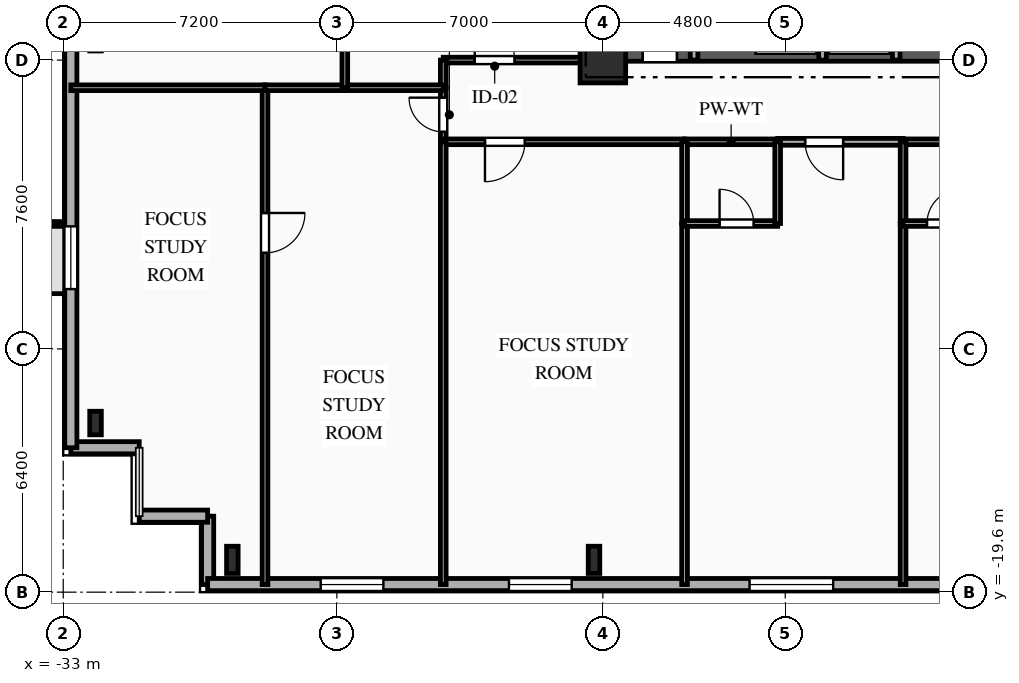
"""IFC4 building model, lengths in metres.
Left out: names, types, materials, properties, quantities, classifications, styles, units other than length and angle.
Written with IfcOpenShell. Run it as: python <this file> out.ifc"""

import sys

from ifc_helpers import new_model, si_unit, direction, frame, frame_2d, origin, origin_2d, place, context, subcontext, project, spatial, rectangle, i_section, extrude, element, fill, save


model = new_model("IFC4")
c1 = context("Model", 3, precision=1e-05, world=origin(), true_north=direction((0.0, 1.0)))
c2 = subcontext(c1, "Body", "Model", "MODEL_VIEW")
j1 = project(units=[si_unit("LENGTHUNIT", "METRE"), si_unit("PLANEANGLEUNIT", "RADIAN")], contexts=[c1])
p1 = place(None, origin())
s1 = spatial("IfcSite", under=j1, at=p1, CompositionType="ELEMENT")
p2 = place(p1, origin())
s2 = spatial("IfcBuilding", under=s1, at=p2, CompositionType="ELEMENT")
p3 = place(p2, frame((0.0, 0.0, 67.2)))
s3 = spatial("IfcBuildingStorey", under=s2, at=p3, CompositionType="ELEMENT", Elevation=67.2)
p4 = place(p3, frame((-18.8, -5.6, 0.0), z_axis=(0.0, 0.0, 1.0), x_axis=(1.0, 0.0, 0.0)))
e1 = element("IfcColumn", 1, at=p4, inside=s3, PredefinedType="COLUMN", context=c2, shape_type="SweptSolid", body=[
    extrude(rectangle(XDim=1.2, YDim=1.2, at=origin_2d()), origin(), (0.0, 0.0, 1.0), 3.35),
])
for number, where, z_axis, x_axis in (
    (2, (-28.55, -18.75, 0.0), (0.0, 0.0, 1.0), (1.0, 0.0, 0.0)),
    (3, (-19.033, -18.75, 0.0), (0.0, 0.0, 1.0), (1.0, 0.0, 0.0)),
):
    element("IfcColumn", number, at=place(p3, frame(where, z_axis=z_axis, x_axis=x_axis)), inside=s3, PredefinedType="COLUMN", context=c2, shape_type="SweptSolid", body=[
        extrude(i_section(OverallWidth=0.304, OverallDepth=0.716, WebThickness=0.021, FlangeThickness=0.04, FilletRadius=0.027, at=origin_2d()), origin(), (0.0, 0.0, 1.0), 3.35),
    ])
p5 = place(p3, frame((-32.15, -15.15, 0.0), z_axis=(0.0, 0.0, 1.0), x_axis=(1.0, 0.0, 0.0)))
e4 = element("IfcColumn", 4, at=p5, inside=s3, PredefinedType="COLUMN", context=c2, shape_type="SweptSolid", body=[
    extrude(i_section(OverallWidth=0.305, OverallDepth=0.62, WebThickness=0.021, FlangeThickness=0.04, FilletRadius=0.027, at=origin_2d()), origin(), (0.0, 0.0, 1.0), 3.35),
])
p6 = place(p3, frame((-29.2, -19.4, 0.0), z_axis=(0.0, 0.0, 1.0), x_axis=(0.0, 1.0, 0.0)))
e5 = element("IfcWall", 5, at=p6, inside=s3, PredefinedType="SOLIDWALL", context=c2, shape_type="SweptSolid", body=[
    extrude(rectangle(XDim=1.8, YDim=0.32, at=frame_2d((0.9, 0.0))), origin(), (0.0, 0.0, 1.0), 3.035),
])
for number, where, z_axis, x_axis in (
    (6, (-29.2, -17.6, 0.0), (0.0, 0.0, 1.0), (-1.0, 0.0, 0.0)),
    (7, (-31.0, -15.8, 0.0), (0.0, 0.0, 1.0), (-1.0, 0.0, 0.0)),
):
    element("IfcWall", number, at=place(p3, frame(where, z_axis=z_axis, x_axis=x_axis)), inside=s3, PredefinedType="SOLIDWALL", context=c2, shape_type="SweptSolid", body=[
        extrude(rectangle(XDim=1.8, YDim=0.32, at=frame_2d((0.9, 0.0))), origin(), (0.0, 0.0, 1.0), 3.035),
    ])
p7 = place(p3, frame((-32.8, -15.8, 0.0), z_axis=(0.0, 0.0, 1.0), x_axis=(0.0, 1.0, 0.0)))
e8 = element("IfcWall", 8, at=p7, inside=s3, PredefinedType="SOLIDWALL", context=c2, shape_type="SweptSolid", body=[
    extrude(rectangle(XDim=31.6, YDim=0.32, at=frame_2d((15.8, 0.0))), origin(), (0.0, 0.0, 1.0), 3.035),
])
p8 = place(p7, frame((4.175, 0.0, 0.85)))
e9 = element("IfcOpeningElement", 9, at=p8, cuts=e8, PredefinedType="OPENING", context=c2, shape_type="SweptSolid", body=[
    extrude(rectangle(XDim=1.65, YDim=1.85, at=frame_2d((0.825, 0.925))), frame((0.0, 0.17, 0.0), z_axis=(0.0, -1.0, 0.0), x_axis=(1.0, 0.0, 0.0)), (0.0, 0.0, 1.0), 0.34),
])
p9 = place(p7, frame((15.015, 0.0, 0.85)))
e10 = element("IfcOpeningElement", 10, at=p9, cuts=e8, PredefinedType="OPENING", context=c2, shape_type="SweptSolid", body=[
    extrude(rectangle(XDim=1.65, YDim=1.85, at=frame_2d((0.825, 0.925))), frame((0.0, 0.17, 0.0), z_axis=(0.0, -1.0, 0.0), x_axis=(1.0, 0.0, 0.0)), (0.0, 0.0, 1.0), 0.34),
])
p10 = place(p7, frame((25.855, 0.0, 0.85)))
e11 = element("IfcOpeningElement", 11, at=p10, cuts=e8, PredefinedType="OPENING", context=c2, shape_type="SweptSolid", body=[
    extrude(rectangle(XDim=1.65, YDim=1.85, at=frame_2d((0.825, 0.925))), frame((0.0, 0.17, 0.0), z_axis=(0.0, -1.0, 0.0), x_axis=(1.0, 0.0, 0.0)), (0.0, 0.0, 1.0), 0.34),
])
p11 = place(p3, frame((29.2, -19.4, 0.0), z_axis=(0.0, 0.0, 1.0), x_axis=(-1.0, 0.0, 0.0)))
e12 = element("IfcWall", 12, at=p11, inside=s3, PredefinedType="SOLIDWALL", context=c2, shape_type="SweptSolid", body=[
    extrude(rectangle(XDim=58.4, YDim=0.32, at=frame_2d((29.2, 0.0))), origin(), (0.0, 0.0, 1.0), 3.035),
])
p12 = place(p11, frame((2.535, 0.0, 0.85)))
e13 = element("IfcOpeningElement", 13, at=p12, cuts=e12, PredefinedType="OPENING", context=c2, shape_type="SweptSolid", body=[
    extrude(rectangle(XDim=1.65, YDim=1.85, at=frame_2d((0.825, 0.925))), frame((0.0, 0.17, 0.0), z_axis=(0.0, -1.0, 0.0), x_axis=(1.0, 0.0, 0.0)), (0.0, 0.0, 1.0), 0.34),
])
p13 = place(p11, frame((7.975, 0.0, 0.85)))
e14 = element("IfcOpeningElement", 14, at=p13, cuts=e12, PredefinedType="OPENING", context=c2, shape_type="SweptSolid", body=[
    extrude(rectangle(XDim=1.65, YDim=1.85, at=frame_2d((0.825, 0.925))), frame((0.0, 0.17, 0.0), z_axis=(0.0, -1.0, 0.0), x_axis=(1.0, 0.0, 0.0)), (0.0, 0.0, 1.0), 0.34),
])
p14 = place(p11, frame((13.14, 0.0, 0.85)))
e15 = element("IfcOpeningElement", 15, at=p14, cuts=e12, PredefinedType="OPENING", context=c2, shape_type="SweptSolid", body=[
    extrude(rectangle(XDim=2.2, YDim=1.85, at=frame_2d((1.1, 0.925))), frame((0.0, 0.17, 0.0), z_axis=(0.0, -1.0, 0.0), x_axis=(1.0, 0.0, 0.0)), (0.0, 0.0, 1.0), 0.34),
])
p15 = place(p11, frame((19.992, 0.0, 0.85)))
e16 = element("IfcOpeningElement", 16, at=p15, cuts=e12, PredefinedType="OPENING", context=c2, shape_type="SweptSolid", body=[
    extrude(rectangle(XDim=2.2, YDim=1.85, at=frame_2d((1.1, 0.925))), frame((0.0, 0.17, 0.0), z_axis=(0.0, -1.0, 0.0), x_axis=(1.0, 0.0, 0.0)), (0.0, 0.0, 1.0), 0.34),
])
p16 = place(p11, frame((24.66, 0.0, 0.85)))
e17 = element("IfcOpeningElement", 17, at=p16, cuts=e12, PredefinedType="OPENING", context=c2, shape_type="SweptSolid", body=[
    extrude(rectangle(XDim=2.2, YDim=1.85, at=frame_2d((1.1, 0.925))), frame((0.0, 0.17, 0.0), z_axis=(0.0, -1.0, 0.0), x_axis=(1.0, 0.0, 0.0)), (0.0, 0.0, 1.0), 0.34),
])
p17 = place(p11, frame((30.42, 0.0, 0.85)))
e18 = element("IfcOpeningElement", 18, at=p17, cuts=e12, PredefinedType="OPENING", context=c2, shape_type="SweptSolid", body=[
    extrude(rectangle(XDim=2.2, YDim=1.85, at=frame_2d((1.1, 0.925))), frame((0.0, 0.17, 0.0), z_axis=(0.0, -1.0, 0.0), x_axis=(1.0, 0.0, 0.0)), (0.0, 0.0, 1.0), 0.34),
])
p18 = place(p11, frame((36.18, 0.0, 0.85)))
e19 = element("IfcOpeningElement", 19, at=p18, cuts=e12, PredefinedType="OPENING", context=c2, shape_type="SweptSolid", body=[
    extrude(rectangle(XDim=2.2, YDim=1.85, at=frame_2d((1.1, 0.925))), frame((0.0, 0.17, 0.0), z_axis=(0.0, -1.0, 0.0), x_axis=(1.0, 0.0, 0.0)), (0.0, 0.0, 1.0), 0.34),
])
p19 = place(p11, frame((41.94, 0.0, 0.85)))
e20 = element("IfcOpeningElement", 20, at=p19, cuts=e12, PredefinedType="OPENING", context=c2, shape_type="SweptSolid", body=[
    extrude(rectangle(XDim=2.2, YDim=1.85, at=frame_2d((1.1, 0.925))), frame((0.0, 0.17, 0.0), z_axis=(0.0, -1.0, 0.0), x_axis=(1.0, 0.0, 0.0)), (0.0, 0.0, 1.0), 0.34),
])
p20 = place(p11, frame((48.821, 0.0, 0.85)))
e21 = element("IfcOpeningElement", 21, at=p20, cuts=e12, PredefinedType="OPENING", context=c2, shape_type="SweptSolid", body=[
    extrude(rectangle(XDim=1.65, YDim=1.85, at=frame_2d((0.825, 0.925))), frame((0.0, 0.17, 0.0), z_axis=(0.0, -1.0, 0.0), x_axis=(1.0, 0.0, 0.0)), (0.0, 0.0, 1.0), 0.34),
])
p21 = place(p11, frame((53.775, 0.0, 0.85)))
e22 = element("IfcOpeningElement", 22, at=p21, cuts=e12, PredefinedType="OPENING", context=c2, shape_type="SweptSolid", body=[
    extrude(rectangle(XDim=1.65, YDim=1.85, at=frame_2d((0.825, 0.925))), frame((0.0, 0.17, 0.0), z_axis=(0.0, -1.0, 0.0), x_axis=(1.0, 0.0, 0.0)), (0.0, 0.0, 1.0), 0.34),
])
p22 = place(p3, frame((-18.8, -5.35, 0.0), z_axis=(0.0, 0.0, 1.0), x_axis=(1.0, 0.0, 0.0)))
e23 = element("IfcWall", 23, at=p22, inside=s3, PredefinedType="SHEAR", context=c2, shape_type="SweptSolid", body=[
    extrude(rectangle(XDim=9.6, YDim=0.56, at=frame_2d((4.8, 0.0))), origin(), (0.0, 0.0, 1.0), 3.035),
])
p23 = place(p22, frame((1.05, 0.0, 0.0)))
e24 = element("IfcOpeningElement", 24, at=p23, cuts=e23, PredefinedType="OPENING", context=c2, shape_type="SweptSolid", body=[
    extrude(rectangle(XDim=0.9, YDim=2.1, at=frame_2d((0.45, 1.05))), frame((0.0, 0.29, 0.0), z_axis=(0.0, -1.0, 0.0), x_axis=(1.0, 0.0, 0.0)), (0.0, 0.0, 1.0), 0.58),
])
p24 = place(p3, frame((-16.4, -5.6, 0.0), z_axis=(0.0, 0.0, 1.0), x_axis=(0.0, 1.0, 0.0)))
e25 = element("IfcWall", 25, at=p24, inside=s3, PredefinedType="PARTITIONING", context=c2, shape_type="SweptSolid", body=[
    extrude(rectangle(XDim=3.49, YDim=0.2, at=frame_2d((1.745, 0.0))), origin(), (0.0, 0.0, 1.0), 3.035),
])
for number, where, z_axis, x_axis in (
    (26, (-13.02, -5.6, 0.0), (0.0, 0.0, 1.0), (0.0, 1.0, 0.0)),
    (27, (-11.08, -5.6, 0.0), (0.0, 0.0, 1.0), (0.0, 1.0, 0.0)),
):
    element("IfcWall", number, at=place(p3, frame(where, z_axis=z_axis, x_axis=x_axis)), inside=s3, PredefinedType="PARTITIONING", context=c2, shape_type="SweptSolid", body=[
        extrude(rectangle(XDim=2.25, YDim=0.2, at=frame_2d((1.125, 0.0))), origin(), (0.0, 0.0, 1.0), 3.035),
    ])
p25 = place(p3, frame((-23.0, -7.75, 0.0), z_axis=(0.0, 0.0, 1.0), x_axis=(0.0, 1.0, 0.0)))
e28 = element("IfcWall", 28, at=p25, inside=s3, PredefinedType="PARTITIONING", context=c2, shape_type="SweptSolid", body=[
    extrude(rectangle(XDim=1.423, YDim=0.15, at=frame_2d((0.711, 0.0))), origin(), (0.0, 0.0, 1.0), 3.035),
])
p26 = place(p25, frame((0.261, 0.0, 0.0)))
e29 = element("IfcOpeningElement", 29, at=p26, cuts=e28, PredefinedType="OPENING", context=c2, shape_type="SweptSolid", body=[
    extrude(rectangle(XDim=0.9, YDim=2.1, at=frame_2d((0.45, 1.05))), frame((0.0, 0.085, 0.0), z_axis=(0.0, -1.0, 0.0), x_axis=(1.0, 0.0, 0.0)), (0.0, 0.0, 1.0), 0.17),
])
p27 = place(p3, frame((-23.0, -5.6, 0.0), z_axis=(0.0, 0.0, 1.0), x_axis=(1.0, 0.0, 0.0)))
e30 = element("IfcWall", 30, at=p27, inside=s3, PredefinedType="PARTITIONING", context=c2, shape_type="SweptSolid", body=[
    extrude(rectangle(XDim=4.2, YDim=0.15, at=frame_2d((2.1, 0.0))), origin(), (0.0, 0.0, 1.0), 3.035),
])
p28 = place(p27, frame((0.829, 0.0, 0.0)))
e31 = element("IfcOpeningElement", 31, at=p28, cuts=e30, PredefinedType="OPENING", context=c2, shape_type="SweptSolid", body=[
    extrude(rectangle(XDim=1.05, YDim=2.15, at=frame_2d((0.525, 1.075))), frame((0.0, 0.085, 0.0), z_axis=(0.0, -1.0, 0.0), x_axis=(1.0, 0.0, 0.0)), (0.0, 0.0, 1.0), 0.17),
])
p29 = place(p3, frame((-23.0, -6.327, 0.0), z_axis=(0.0, 0.0, 1.0), x_axis=(0.0, 1.0, 0.0)))
e32 = element("IfcWall", 32, at=p29, inside=s3, PredefinedType="PARTITIONING", context=c2, shape_type="SweptSolid", body=[
    extrude(rectangle(XDim=0.727, YDim=0.15, at=frame_2d((0.363, 0.0))), origin(), (0.0, 0.0, 1.0), 3.035),
])
p30 = place(p3, frame((-16.65, -7.75, 0.0), z_axis=(0.0, 0.0, 1.0), x_axis=(-1.0, 0.0, 0.0)))
e33 = element("IfcWall", 33, at=p30, inside=s3, PredefinedType="PARTITIONING", context=c2, shape_type="SweptSolid", body=[
    extrude(rectangle(XDim=6.35, YDim=0.15, at=frame_2d((3.175, 0.0))), origin(), (0.0, 0.0, 1.0), 3.035),
])
p31 = place(p30, frame((4.202, 0.0, 0.0)))
e34 = element("IfcOpeningElement", 34, at=p31, cuts=e33, PredefinedType="OPENING", context=c2, shape_type="SweptSolid", body=[
    extrude(rectangle(XDim=1.05, YDim=2.15, at=frame_2d((0.525, 1.075))), frame((0.0, 0.085, 0.0), z_axis=(0.0, -1.0, 0.0), x_axis=(1.0, 0.0, 0.0)), (0.0, 0.0, 1.0), 0.17),
])
p32 = place(p3, frame((-10.9, -7.75, 0.0), z_axis=(0.0, 0.0, 1.0), x_axis=(-1.0, 0.0, 0.0)))
e35 = element("IfcWall", 35, at=p32, inside=s3, PredefinedType="PARTITIONING", context=c2, shape_type="SweptSolid", body=[
    extrude(rectangle(XDim=3.3, YDim=0.18, at=frame_2d((1.65, 0.0))), origin(), (0.0, 0.0, 1.0), 3.035),
])
p33 = place(p32, frame((1.577, 0.0, 0.0)))
e36 = element("IfcOpeningElement", 36, at=p33, cuts=e35, PredefinedType="OPENING", context=c2, shape_type="SweptSolid", body=[
    extrude(rectangle(XDim=1.0, YDim=2.15, at=frame_2d((0.5, 1.075))), frame((0.0, 0.1, 0.0), z_axis=(0.0, -1.0, 0.0), x_axis=(1.0, 0.0, 0.0)), (0.0, 0.0, 1.0), 0.2),
])
for number, where, z_axis, x_axis in (
    (37, (-14.2, -7.75, 0.0), (0.0, 0.0, 1.0), (-1.0, 0.0, 0.0)),
    (38, (-8.45, -7.75, 0.0), (0.0, 0.0, 1.0), (-1.0, 0.0, 0.0)),
):
    element("IfcWall", number, at=place(p3, frame(where, z_axis=z_axis, x_axis=x_axis)), inside=s3, PredefinedType="PLUMBINGWALL", context=c2, shape_type="SweptSolid", body=[
        extrude(rectangle(XDim=2.45, YDim=0.15, at=frame_2d((1.225, 0.0))), origin(), (0.0, 0.0, 1.0), 3.035),
    ])
p34 = place(p3, frame((-27.69, -6.327, 0.0), z_axis=(0.0, 0.0, 1.0), x_axis=(0.0, -1.0, 0.0)))
e39 = element("IfcWall", 39, at=p34, inside=s3, PredefinedType="PARTITIONING", context=c2, shape_type="SweptSolid", body=[
    extrude(rectangle(XDim=13.073, YDim=0.15, at=frame_2d((6.537, 0.0))), origin(), (0.0, 0.0, 1.0), 3.035),
])
p35 = place(p34, frame((3.296, 0.0, 0.0)))
e40 = element("IfcOpeningElement", 40, at=p35, cuts=e39, PredefinedType="OPENING", context=c2, shape_type="SweptSolid", body=[
    extrude(rectangle(XDim=1.05, YDim=2.15, at=frame_2d((0.525, 1.075))), frame((0.0, 0.085, 0.0), z_axis=(0.0, -1.0, 0.0), x_axis=(1.0, 0.0, 0.0)), (0.0, 0.0, 1.0), 0.17),
])
p36 = place(p3, frame((-32.8, -6.327, 0.0), z_axis=(0.0, 0.0, 1.0), x_axis=(1.0, 0.0, 0.0)))
e41 = element("IfcWall", 41, at=p36, inside=s3, PredefinedType="PARTITIONING", context=c2, shape_type="SweptSolid", body=[
    extrude(rectangle(XDim=5.11, YDim=0.15, at=frame_2d((2.555, 0.0))), origin(), (0.0, 0.0, 1.0), 3.035),
])
p37 = place(p3, frame((-27.69, -6.327, 0.0), z_axis=(0.0, 0.0, 1.0), x_axis=(1.0, 0.0, 0.0)))
e42 = element("IfcWall", 42, at=p37, inside=s3, PredefinedType="PARTITIONING", context=c2, shape_type="SweptSolid", body=[
    extrude(rectangle(XDim=2.1, YDim=0.15, at=frame_2d((1.05, 0.0))), origin(), (0.0, 0.0, 1.0), 3.035),
])
p38 = place(p3, frame((-25.59, -6.327, 0.0), z_axis=(0.0, 0.0, 1.0), x_axis=(1.0, 0.0, 0.0)))
e43 = element("IfcWall", 43, at=p38, inside=s3, PredefinedType="PARTITIONING", context=c2, shape_type="SweptSolid", body=[
    extrude(rectangle(XDim=2.59, YDim=0.15, at=frame_2d((1.295, 0.0))), origin(), (0.0, 0.0, 1.0), 3.035),
])
p39 = place(p3, frame((-23.0, -7.75, 0.0), z_axis=(0.0, 0.0, 1.0), x_axis=(0.0, -1.0, 0.0)))
e44 = element("IfcWall", 44, at=p39, inside=s3, PredefinedType="PARTITIONING", context=c2, shape_type="SweptSolid", body=[
    extrude(rectangle(XDim=11.65, YDim=0.15, at=frame_2d((5.825, 0.0))), origin(), (0.0, 0.0, 1.0), 3.035),
])
p40 = place(p3, frame((-25.59, 6.327, 0.0), z_axis=(0.0, 0.0, 1.0), x_axis=(0.0, -1.0, 0.0)))
e45 = element("IfcWall", 45, at=p40, inside=s3, PredefinedType="PARTITIONING", context=c2, shape_type="SweptSolid", body=[
    extrude(rectangle(XDim=12.654, YDim=0.15, at=frame_2d((6.327, 0.0))), origin(), (0.0, 0.0, 1.0), 2.69),
])
p41 = place(p40, frame((5.802, 0.0, 0.0)))
e46 = element("IfcOpeningElement", 46, at=p41, cuts=e45, PredefinedType="OPENING", context=c2, shape_type="SweptSolid", body=[
    extrude(rectangle(XDim=1.05, YDim=2.15, at=frame_2d((0.525, 1.075))), frame((0.0, 0.085, 0.0), z_axis=(0.0, -1.0, 0.0), x_axis=(1.0, 0.0, 0.0)), (0.0, 0.0, 1.0), 0.17),
])
p42 = place(p3, frame((-16.65, -9.9, 0.0), z_axis=(0.0, 0.0, 1.0), x_axis=(0.0, -1.0, 0.0)))
e47 = element("IfcWall", 47, at=p42, inside=s3, PredefinedType="PARTITIONING", context=c2, shape_type="SweptSolid", body=[
    extrude(rectangle(XDim=9.5, YDim=0.15, at=frame_2d((4.75, 0.0))), origin(), (0.0, 0.0, 1.0), 3.035),
])
p43 = place(p3, frame((-16.65, -7.75, 0.0), z_axis=(0.0, 0.0, 1.0), x_axis=(0.0, -1.0, 0.0)))
e48 = element("IfcWall", 48, at=p43, inside=s3, PredefinedType="PLUMBINGWALL", context=c2, shape_type="SweptSolid", body=[
    extrude(rectangle(XDim=2.15, YDim=0.15, at=frame_2d((1.075, 0.0))), origin(), (0.0, 0.0, 1.0), 3.035),
])
p44 = place(p3, frame((-16.65, -9.9, 0.0), z_axis=(0.0, 0.0, 1.0), x_axis=(1.0, 0.0, 0.0)))
e49 = element("IfcWall", 49, at=p44, inside=s3, PredefinedType="PLUMBINGWALL", context=c2, shape_type="SweptSolid", body=[
    extrude(rectangle(XDim=2.45, YDim=0.15, at=frame_2d((1.225, 0.0))), origin(), (0.0, 0.0, 1.0), 3.035),
])
p45 = place(p44, frame((0.921, 0.0, 0.0)))
e50 = element("IfcOpeningElement", 50, at=p45, cuts=e49, PredefinedType="OPENING", context=c2, shape_type="SweptSolid", body=[
    extrude(rectangle(XDim=0.9, YDim=2.1, at=frame_2d((0.45, 1.05))), frame((0.0, 0.085, 0.0), z_axis=(0.0, -1.0, 0.0), x_axis=(1.0, 0.0, 0.0)), (0.0, 0.0, 1.0), 0.17),
])
p46 = place(p3, frame((-14.2, -9.9, 0.0), z_axis=(0.0, 0.0, 1.0), x_axis=(0.0, 1.0, 0.0)))
e51 = element("IfcWall", 51, at=p46, inside=s3, PredefinedType="PLUMBINGWALL", context=c2, shape_type="SweptSolid", body=[
    extrude(rectangle(XDim=2.15, YDim=0.15, at=frame_2d((1.075, 0.0))), origin(), (0.0, 0.0, 1.0), 3.035),
])
p47 = place(p3, frame((-10.9, -9.9, 0.0), z_axis=(0.0, 0.0, 1.0), x_axis=(0.0, -1.0, 0.0)))
e52 = element("IfcWall", 52, at=p47, inside=s3, PredefinedType="PARTITIONING", context=c2, shape_type="SweptSolid", body=[
    extrude(rectangle(XDim=9.5, YDim=0.15, at=frame_2d((4.75, 0.0))), origin(), (0.0, 0.0, 1.0), 3.035),
])
p48 = place(p3, frame((-10.9, -7.75, 0.0), z_axis=(0.0, 0.0, 1.0), x_axis=(0.0, -1.0, 0.0)))
e53 = element("IfcWall", 53, at=p48, inside=s3, PredefinedType="PLUMBINGWALL", context=c2, shape_type="SweptSolid", body=[
    extrude(rectangle(XDim=2.15, YDim=0.15, at=frame_2d((1.075, 0.0))), origin(), (0.0, 0.0, 1.0), 3.035),
])
p49 = place(p3, frame((-10.9, -9.9, 0.0), z_axis=(0.0, 0.0, 1.0), x_axis=(1.0, 0.0, 0.0)))
e54 = element("IfcWall", 54, at=p49, inside=s3, PredefinedType="PLUMBINGWALL", context=c2, shape_type="SweptSolid", body=[
    extrude(rectangle(XDim=2.45, YDim=0.15, at=frame_2d((1.225, 0.0))), origin(), (0.0, 0.0, 1.0), 3.035),
])
p50 = place(p49, frame((0.629, 0.0, 0.0)))
e55 = element("IfcOpeningElement", 55, at=p50, cuts=e54, PredefinedType="OPENING", context=c2, shape_type="SweptSolid", body=[
    extrude(rectangle(XDim=0.9, YDim=2.1, at=frame_2d((0.45, 1.05))), frame((0.0, 0.085, 0.0), z_axis=(0.0, -1.0, 0.0), x_axis=(1.0, 0.0, 0.0)), (0.0, 0.0, 1.0), 0.17),
])
p51 = place(p8, origin())
e56 = element("IfcWindow", 56, at=p51, inside=s3, PartitioningType="SINGLE_PANEL", PredefinedType="WINDOW", context=c2, shape_type="SweptSolid", body=[
    extrude(rectangle(XDim=1.65, YDim=1.85, at=frame_2d((0.825, 0.925))), frame((0.0, 0.03, 0.0), z_axis=(0.0, -1.0, 0.0), x_axis=(1.0, 0.0, 0.0)), (0.0, 0.0, 1.0), 0.06),
])
fill(e9, e56)
p52 = place(p19, origin())
e57 = element("IfcWindow", 57, at=p52, inside=s3, PartitioningType="SINGLE_PANEL", PredefinedType="WINDOW", context=c2, shape_type="SweptSolid", body=[
    extrude(rectangle(XDim=2.2, YDim=1.85, at=frame_2d((1.1, 0.925))), frame((0.0, 0.03, 0.0), z_axis=(0.0, -1.0, 0.0), x_axis=(1.0, 0.0, 0.0)), (0.0, 0.0, 1.0), 0.06),
])
fill(e20, e57)
p53 = place(p20, origin())
e58 = element("IfcWindow", 58, at=p53, inside=s3, PartitioningType="SINGLE_PANEL", PredefinedType="WINDOW", context=c2, shape_type="SweptSolid", body=[
    extrude(rectangle(XDim=1.65, YDim=1.85, at=frame_2d((0.825, 0.925))), frame((0.0, 0.03, 0.0), z_axis=(0.0, -1.0, 0.0), x_axis=(1.0, 0.0, 0.0)), (0.0, 0.0, 1.0), 0.06),
])
fill(e21, e58)
p54 = place(p21, origin())
e59 = element("IfcWindow", 59, at=p54, inside=s3, PartitioningType="SINGLE_PANEL", PredefinedType="WINDOW", context=c2, shape_type="SweptSolid", body=[
    extrude(rectangle(XDim=1.65, YDim=1.85, at=frame_2d((0.825, 0.925))), frame((0.0, 0.03, 0.0), z_axis=(0.0, -1.0, 0.0), x_axis=(1.0, 0.0, 0.0)), (0.0, 0.0, 1.0), 0.06),
])
fill(e22, e59)
p55 = place(p26, origin())
e60 = element("IfcDoor", 60, at=p55, inside=s3, OperationType="SINGLE_SWING_RIGHT", PredefinedType="DOOR", context=c2, shape_type="SweptSolid", body=[
    extrude(rectangle(XDim=0.9, YDim=2.1, at=frame_2d((0.45, 1.05))), frame((0.0, 0.025, 0.0), z_axis=(0.0, -1.0, 0.0), x_axis=(1.0, 0.0, 0.0)), (0.0, 0.0, 1.0), 0.05),
])
fill(e29, e60)
p56 = place(p28, origin())
e61 = element("IfcDoor", 61, at=p56, inside=s3, OperationType="SINGLE_SWING_LEFT", PredefinedType="DOOR", context=c2, shape_type="SweptSolid", body=[
    extrude(rectangle(XDim=1.05, YDim=2.15, at=frame_2d((0.525, 1.075))), frame((0.0, 0.025, 0.0), z_axis=(0.0, -1.0, 0.0), x_axis=(1.0, 0.0, 0.0)), (0.0, 0.0, 1.0), 0.05),
])
fill(e31, e61)
p57 = place(p31, origin())
e62 = element("IfcDoor", 62, at=p57, inside=s3, OperationType="SINGLE_SWING_RIGHT", PredefinedType="DOOR", context=c2, shape_type="SweptSolid", body=[
    extrude(rectangle(XDim=1.05, YDim=2.15, at=frame_2d((0.525, 1.075))), frame((0.0, 0.025, 0.0), z_axis=(0.0, -1.0, 0.0), x_axis=(1.0, 0.0, 0.0)), (0.0, 0.0, 1.0), 0.05),
])
fill(e34, e62)
p58 = place(p33, origin())
e63 = element("IfcDoor", 63, at=p58, inside=s3, OperationType="SINGLE_SWING_LEFT", PredefinedType="DOOR", context=c2, shape_type="SweptSolid", body=[
    extrude(rectangle(XDim=1.0, YDim=2.15, at=frame_2d((0.5, 1.075))), frame((0.0, 0.025, 0.0), z_axis=(0.0, -1.0, 0.0), x_axis=(1.0, 0.0, 0.0)), (0.0, 0.0, 1.0), 0.05),
])
fill(e36, e63)
p59 = place(p35, origin())
e64 = element("IfcDoor", 64, at=p59, inside=s3, OperationType="SINGLE_SWING_LEFT", PredefinedType="DOOR", context=c2, shape_type="SweptSolid", body=[
    extrude(rectangle(XDim=1.05, YDim=2.15, at=frame_2d((0.525, 1.075))), frame((0.0, 0.025, 0.0), z_axis=(0.0, -1.0, 0.0), x_axis=(1.0, 0.0, 0.0)), (0.0, 0.0, 1.0), 0.05),
])
fill(e40, e64)
p60 = place(p45, origin())
e65 = element("IfcDoor", 65, at=p60, inside=s3, OperationType="SINGLE_SWING_LEFT", PredefinedType="DOOR", context=c2, shape_type="SweptSolid", body=[
    extrude(rectangle(XDim=0.9, YDim=2.1, at=frame_2d((0.45, 1.05))), frame((0.0, 0.025, 0.0), z_axis=(0.0, -1.0, 0.0), x_axis=(1.0, 0.0, 0.0)), (0.0, 0.0, 1.0), 0.05),
])
fill(e50, e65)
p61 = place(p50, origin())
e66 = element("IfcDoor", 66, at=p61, inside=s3, OperationType="SINGLE_SWING_RIGHT", PredefinedType="DOOR", context=c2, shape_type="SweptSolid", body=[
    extrude(rectangle(XDim=0.9, YDim=2.1, at=frame_2d((0.45, 1.05))), frame((0.0, 0.025, 0.0), z_axis=(0.0, -1.0, 0.0), x_axis=(1.0, 0.0, 0.0)), (0.0, 0.0, 1.0), 0.05),
])
fill(e55, e66)
save(model, sys.argv[1])
